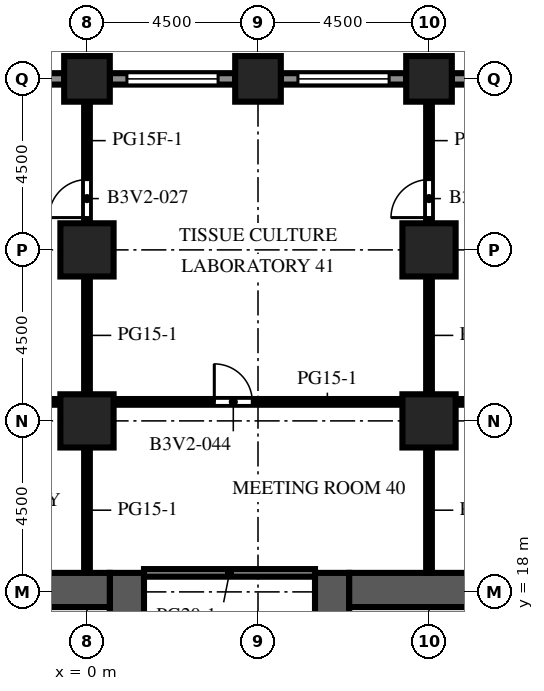
"""IFC4 building model, lengths in metres.
Left out: names, types, materials, properties, quantities, classifications, styles, units other than length and angle.
Written with IfcOpenShell. Run it as: python <this file> out.ifc"""

import sys

from ifc_helpers import new_model, si_unit, direction, frame, frame_2d, origin, origin_2d, place, context, subcontext, project, spatial, rectangle, extrude, element, fill, save


model = new_model("IFC4")
c1 = context("Model", 3, precision=1e-05, world=origin(), true_north=direction((0.0, 1.0)))
c2 = subcontext(c1, "Body", "Model", "MODEL_VIEW")
j1 = project(units=[si_unit("LENGTHUNIT", "METRE"), si_unit("PLANEANGLEUNIT", "RADIAN")], contexts=[c1])
p1 = place(None, origin())
s1 = spatial("IfcSite", under=j1, at=p1, CompositionType="ELEMENT")
p2 = place(p1, origin())
s2 = spatial("IfcBuilding", under=s1, at=p2, CompositionType="ELEMENT")
p3 = place(p2, frame((0.0, 0.0, 98.4)))
s3 = spatial("IfcBuildingStorey", under=s2, at=p3, CompositionType="ELEMENT", Elevation=98.4)
for number, where, z_axis, x_axis in (
    (1, (0.0, 31.5, 0.0), (0.0, 0.0, 1.0), (1.0, 0.0, 0.0)),
    (2, (4.5, 31.5, 0.0), (0.0, 0.0, 1.0), (1.0, 0.0, 0.0)),
    (3, (9.0, 31.5, 0.0), (0.0, 0.0, 1.0), (1.0, 0.0, 0.0)),
):
    element("IfcColumn", number, at=place(p3, frame(where, z_axis=z_axis, x_axis=x_axis)), inside=s3, PredefinedType="COLUMN", context=c2, shape_type="SweptSolid", body=[
        extrude(rectangle(XDim=1.2, YDim=1.2, at=origin_2d()), origin(), (0.0, 0.0, 1.0), 4.1),
    ])
for number, where, z_axis, x_axis in (
    (4, (0.0, 22.5, 0.0), (0.0, 0.0, 1.0), (1.0, 0.0, 0.0)),
    (5, (0.0, 27.0, 0.0), (0.0, 0.0, 1.0), (1.0, 0.0, 0.0)),
    (6, (9.0, 22.5, 0.0), (0.0, 0.0, 1.0), (1.0, 0.0, 0.0)),
    (7, (9.0, 27.0, 0.0), (0.0, 0.0, 1.0), (1.0, 0.0, 0.0)),
):
    element("IfcColumn", number, at=place(p3, frame(where, z_axis=z_axis, x_axis=x_axis)), inside=s3, PredefinedType="COLUMN", context=c2, shape_type="SweptSolid", body=[
        extrude(rectangle(XDim=1.4, YDim=1.4, at=origin_2d()), origin(), (0.0, 0.0, 1.0), 4.1),
    ])
p4 = place(p3, frame((1.05, -9.0, 0.0), z_axis=(0.0, 0.0, 1.0), x_axis=(0.0, 1.0, 0.0)))
e8 = element("IfcWall", 8, at=p4, inside=s3, PredefinedType="SHEAR", context=c2, shape_type="SweptSolid", body=[
    extrude(rectangle(XDim=27.5, YDim=0.9, at=frame_2d((13.75, 0.0))), origin(), (0.0, 0.0, 1.0), 4.1),
])
p5 = place(p4, frame((12.55, 0.0, 0.0)))
e9 = element("IfcOpeningElement", 9, at=p5, cuts=e8, PredefinedType="OPENING", context=c2, shape_type="SweptSolid", body=[
    extrude(rectangle(XDim=2.4, YDim=2.4, at=frame_2d((1.2, 1.2))), frame((0.0, 0.46, 0.0), z_axis=(0.0, -1.0, 0.0), x_axis=(1.0, 0.0, 0.0)), (0.0, 0.0, 1.0), 0.92),
])
p6 = place(p4, frame((3.893, 0.0, 0.0)))
e10 = element("IfcOpeningElement", 10, at=p6, cuts=e8, PredefinedType="OPENING", context=c2, shape_type="SweptSolid", body=[
    extrude(rectangle(XDim=0.923, YDim=2.1, at=frame_2d((0.461, 1.05))), frame((0.0, 0.46, 0.0), z_axis=(0.0, -1.0, 0.0), x_axis=(1.0, 0.0, 0.0)), (0.0, 0.0, 1.0), 0.92),
])
p7 = place(p4, frame((23.427, 0.0, 0.0)))
e11 = element("IfcOpeningElement", 11, at=p7, cuts=e8, PredefinedType="OPENING", context=c2, shape_type="SweptSolid", body=[
    extrude(rectangle(XDim=1.2, YDim=2.1, at=frame_2d((0.6, 1.05))), frame((0.0, 0.46, 0.0), z_axis=(0.0, -1.0, 0.0), x_axis=(1.0, 0.0, 0.0)), (0.0, 0.0, 1.0), 0.92),
])
p8 = place(p3, frame((-9.6, 18.05, 0.0), z_axis=(0.0, 0.0, 1.0), x_axis=(1.0, 0.0, 0.0)))
e12 = element("IfcWall", 12, at=p8, inside=s3, PredefinedType="SHEAR", context=c2, shape_type="SweptSolid", body=[
    extrude(rectangle(XDim=10.2, YDim=0.9, at=frame_2d((5.1, 0.0))), origin(), (0.0, 0.0, 1.0), 4.1),
])
p9 = place(p3, frame((6.45, -9.0, 0.0), z_axis=(0.0, 0.0, 1.0), x_axis=(0.0, 1.0, 0.0)))
e13 = element("IfcWall", 13, at=p9, inside=s3, PredefinedType="SHEAR", context=c2, shape_type="SweptSolid", body=[
    extrude(rectangle(XDim=27.5, YDim=0.9, at=frame_2d((13.75, 0.0))), origin(), (0.0, 0.0, 1.0), 4.1),
])
p10 = place(p9, frame((12.55, 0.0, 0.0)))
e14 = element("IfcOpeningElement", 14, at=p10, cuts=e13, PredefinedType="OPENING", context=c2, shape_type="SweptSolid", body=[
    extrude(rectangle(XDim=2.4, YDim=2.4, at=frame_2d((1.2, 1.2))), frame((0.0, 0.46, 0.0), z_axis=(0.0, -1.0, 0.0), x_axis=(1.0, 0.0, 0.0)), (0.0, 0.0, 1.0), 0.92),
])
p11 = place(p9, frame((3.893, 0.0, 0.0)))
e15 = element("IfcOpeningElement", 15, at=p11, cuts=e13, PredefinedType="OPENING", context=c2, shape_type="SweptSolid", body=[
    extrude(rectangle(XDim=0.923, YDim=2.1, at=frame_2d((0.461, 1.05))), frame((0.0, 0.46, 0.0), z_axis=(0.0, -1.0, 0.0), x_axis=(1.0, 0.0, 0.0)), (0.0, 0.0, 1.0), 0.92),
])
p12 = place(p9, frame((23.427, 0.0, 0.0)))
e16 = element("IfcOpeningElement", 16, at=p12, cuts=e13, PredefinedType="OPENING", context=c2, shape_type="SweptSolid", body=[
    extrude(rectangle(XDim=1.2, YDim=2.1, at=frame_2d((0.6, 1.05))), frame((0.0, 0.46, 0.0), z_axis=(0.0, -1.0, 0.0), x_axis=(1.0, 0.0, 0.0)), (0.0, 0.0, 1.0), 0.92),
])
p13 = place(p3, frame((6.9, 18.05, 0.0), z_axis=(0.0, 0.0, 1.0), x_axis=(1.0, 0.0, 0.0)))
e17 = element("IfcWall", 17, at=p13, inside=s3, PredefinedType="SHEAR", context=c2, shape_type="SweptSolid", body=[
    extrude(rectangle(XDim=10.2, YDim=0.9, at=frame_2d((5.1, 0.0))), origin(), (0.0, 0.0, 1.0), 4.1),
])
p14 = place(p3, frame((9.6, 31.5, 0.0), z_axis=(0.0, 0.0, 1.0), x_axis=(1.0, 0.0, 0.0)))
e18 = element("IfcWall", 18, at=p14, inside=s3, PredefinedType="SOLIDWALL", context=c2, shape_type="SweptSolid", body=[
    extrude(rectangle(XDim=3.3, YDim=0.3, at=frame_2d((1.65, 0.0))), origin(), (0.0, 0.0, 1.0), 2.75),
])
p15 = place(p14, frame((0.45, 0.0, 0.8)))
e19 = element("IfcOpeningElement", 19, at=p15, cuts=e18, PredefinedType="OPENING", context=c2, shape_type="SweptSolid", body=[
    extrude(rectangle(XDim=2.4, YDim=1.7, at=frame_2d((1.2, 0.85))), frame((0.0, 0.16, 0.0), z_axis=(0.0, -1.0, 0.0), x_axis=(1.0, 0.0, 0.0)), (0.0, 0.0, 1.0), 0.32),
])
p16 = place(p3, frame((5.1, 31.5, 0.0), z_axis=(0.0, 0.0, 1.0), x_axis=(1.0, 0.0, 0.0)))
e20 = element("IfcWall", 20, at=p16, inside=s3, PredefinedType="SOLIDWALL", context=c2, shape_type="SweptSolid", body=[
    extrude(rectangle(XDim=3.3, YDim=0.3, at=frame_2d((1.65, 0.0))), origin(), (0.0, 0.0, 1.0), 2.75),
])
p17 = place(p16, frame((0.45, 0.0, 0.8)))
e21 = element("IfcOpeningElement", 21, at=p17, cuts=e20, PredefinedType="OPENING", context=c2, shape_type="SweptSolid", body=[
    extrude(rectangle(XDim=2.4, YDim=1.7, at=frame_2d((1.2, 0.85))), frame((0.0, 0.16, 0.0), z_axis=(0.0, -1.0, 0.0), x_axis=(1.0, 0.0, 0.0)), (0.0, 0.0, 1.0), 0.32),
])
p18 = place(p3, frame((0.6, 31.5, 0.0), z_axis=(0.0, 0.0, 1.0), x_axis=(1.0, 0.0, 0.0)))
e22 = element("IfcWall", 22, at=p18, inside=s3, PredefinedType="SOLIDWALL", context=c2, shape_type="SweptSolid", body=[
    extrude(rectangle(XDim=3.3, YDim=0.3, at=frame_2d((1.65, 0.0))), origin(), (0.0, 0.0, 1.0), 2.75),
])
p19 = place(p18, frame((0.45, 0.0, 0.8)))
e23 = element("IfcOpeningElement", 23, at=p19, cuts=e22, PredefinedType="OPENING", context=c2, shape_type="SweptSolid", body=[
    extrude(rectangle(XDim=2.4, YDim=1.7, at=frame_2d((1.2, 0.85))), frame((0.0, 0.16, 0.0), z_axis=(0.0, -1.0, 0.0), x_axis=(1.0, 0.0, 0.0)), (0.0, 0.0, 1.0), 0.32),
])
p20 = place(p3, frame((-3.9, 31.5, 0.0), z_axis=(0.0, 0.0, 1.0), x_axis=(1.0, 0.0, 0.0)))
e24 = element("IfcWall", 24, at=p20, inside=s3, PredefinedType="SOLIDWALL", context=c2, shape_type="SweptSolid", body=[
    extrude(rectangle(XDim=3.3, YDim=0.3, at=frame_2d((1.65, 0.0))), origin(), (0.0, 0.0, 1.0), 2.75),
])
p21 = place(p20, frame((0.45, 0.0, 0.8)))
e25 = element("IfcOpeningElement", 25, at=p21, cuts=e24, PredefinedType="OPENING", context=c2, shape_type="SweptSolid", body=[
    extrude(rectangle(XDim=2.4, YDim=1.7, at=frame_2d((1.2, 0.85))), frame((0.0, 0.16, 0.0), z_axis=(0.0, -1.0, 0.0), x_axis=(1.0, 0.0, 0.0)), (0.0, 0.0, 1.0), 0.32),
])
p22 = place(p3, frame((-0.7, 15.028, 0.0), z_axis=(0.0, 0.0, 1.0), x_axis=(0.0, 1.0, 0.0)))
e26 = element("IfcWall", 26, at=p22, inside=s3, PredefinedType="PARTITIONING", context=c2, shape_type="SweptSolid", body=[
    extrude(rectangle(XDim=2.573, YDim=0.1, at=frame_2d((1.286, 0.0))), origin(), (0.0, 0.0, 1.0), 3.65),
])
p23 = place(p22, frame((0.786, 0.0, 0.0)))
e27 = element("IfcOpeningElement", 27, at=p23, cuts=e26, PredefinedType="OPENING", context=c2, shape_type="SweptSolid", body=[
    extrude(rectangle(XDim=1.0, YDim=2.1, at=frame_2d((0.5, 1.05))), frame((0.0, 0.06, 0.0), z_axis=(0.0, -1.0, 0.0), x_axis=(1.0, 0.0, 0.0)), (0.0, 0.0, 1.0), 0.12),
])
p24 = place(p3, frame((8.2, 15.028, 0.0), z_axis=(0.0, 0.0, 1.0), x_axis=(0.0, 1.0, 0.0)))
e28 = element("IfcWall", 28, at=p24, inside=s3, PredefinedType="PARTITIONING", context=c2, shape_type="SweptSolid", body=[
    extrude(rectangle(XDim=2.573, YDim=0.1, at=frame_2d((1.286, 0.0))), origin(), (0.0, 0.0, 1.0), 3.65),
])
p25 = place(p24, frame((0.786, 0.0, 0.0)))
e29 = element("IfcOpeningElement", 29, at=p25, cuts=e28, PredefinedType="OPENING", context=c2, shape_type="SweptSolid", body=[
    extrude(rectangle(XDim=1.0, YDim=2.1, at=frame_2d((0.5, 1.05))), frame((0.0, 0.06, 0.0), z_axis=(0.0, -1.0, 0.0), x_axis=(1.0, 0.0, 0.0)), (0.0, 0.0, 1.0), 0.12),
])
p26 = place(p3, frame((0.0, 18.5, 0.0), z_axis=(0.0, 0.0, 1.0), x_axis=(0.0, 1.0, 0.0)))
e30 = element("IfcWall", 30, at=p26, inside=s3, PredefinedType="PARTITIONING", context=c2, shape_type="SweptSolid", body=[
    extrude(rectangle(XDim=3.3, YDim=0.15, at=frame_2d((1.65, 0.0))), origin(), (0.0, 0.0, 1.0), 3.65),
])
p27 = place(p3, frame((0.0, 23.2, 0.0), z_axis=(0.0, 0.0, 1.0), x_axis=(0.0, 1.0, 0.0)))
e31 = element("IfcWall", 31, at=p27, inside=s3, PredefinedType="PARTITIONING", context=c2, shape_type="SweptSolid", body=[
    extrude(rectangle(XDim=3.1, YDim=0.15, at=frame_2d((1.55, 0.0))), origin(), (0.0, 0.0, 1.0), 3.65),
])
p28 = place(p3, frame((0.0, 30.9, 0.0), z_axis=(0.0, 0.0, 1.0), x_axis=(0.0, -1.0, 0.0)))
e32 = element("IfcWall", 32, at=p28, inside=s3, PredefinedType="PARTITIONING", context=c2, shape_type="SweptSolid", body=[
    extrude(rectangle(XDim=3.2, YDim=0.15, at=frame_2d((1.6, 0.0))), origin(), (0.0, 0.0, 1.0), 3.65),
])
p29 = place(p28, frame((2.05, 0.0, 0.0)))
e33 = element("IfcOpeningElement", 33, at=p29, cuts=e32, PredefinedType="OPENING", context=c2, shape_type="SweptSolid", body=[
    extrude(rectangle(XDim=1.0, YDim=2.1, at=frame_2d((0.5, 1.05))), frame((0.0, 0.085, 0.0), z_axis=(0.0, -1.0, 0.0), x_axis=(1.0, 0.0, 0.0)), (0.0, 0.0, 1.0), 0.17),
])
p30 = place(p3, frame((9.0, 18.5, 0.0), z_axis=(0.0, 0.0, 1.0), x_axis=(0.0, 1.0, 0.0)))
e34 = element("IfcWall", 34, at=p30, inside=s3, PredefinedType="PARTITIONING", context=c2, shape_type="SweptSolid", body=[
    extrude(rectangle(XDim=3.3, YDim=0.15, at=frame_2d((1.65, 0.0))), origin(), (0.0, 0.0, 1.0), 3.65),
])
p31 = place(p3, frame((9.0, 23.2, 0.0), z_axis=(0.0, 0.0, 1.0), x_axis=(0.0, 1.0, 0.0)))
e35 = element("IfcWall", 35, at=p31, inside=s3, PredefinedType="PARTITIONING", context=c2, shape_type="SweptSolid", body=[
    extrude(rectangle(XDim=3.1, YDim=0.15, at=frame_2d((1.55, 0.0))), origin(), (0.0, 0.0, 1.0), 3.65),
])
p32 = place(p3, frame((9.0, 30.9, 0.0), z_axis=(0.0, 0.0, 1.0), x_axis=(0.0, -1.0, 0.0)))
e36 = element("IfcWall", 36, at=p32, inside=s3, PredefinedType="PARTITIONING", context=c2, shape_type="SweptSolid", body=[
    extrude(rectangle(XDim=3.2, YDim=0.15, at=frame_2d((1.6, 0.0))), origin(), (0.0, 0.0, 1.0), 3.65),
])
p33 = place(p32, frame((2.05, 0.0, 0.0)))
e37 = element("IfcOpeningElement", 37, at=p33, cuts=e36, PredefinedType="OPENING", context=c2, shape_type="SweptSolid", body=[
    extrude(rectangle(XDim=1.0, YDim=2.1, at=frame_2d((0.5, 1.05))), frame((0.0, 0.085, 0.0), z_axis=(0.0, -1.0, 0.0), x_axis=(1.0, 0.0, 0.0)), (0.0, 0.0, 1.0), 0.17),
])
p34 = place(p3, frame((1.5, 18.5, 0.0), z_axis=(0.0, 0.0, 1.0), x_axis=(1.0, 0.0, 0.0)))
e38 = element("IfcWall", 38, at=p34, inside=s3, PredefinedType="PARTITIONING", context=c2, shape_type="SweptSolid", body=[
    extrude(rectangle(XDim=4.5, YDim=0.2, at=frame_2d((2.25, 0.0))), origin(), (0.0, 0.0, 1.0), 3.65),
])
p35 = place(p3, frame((-0.7, 23.0, 0.0), z_axis=(0.0, 0.0, 1.0), x_axis=(-1.0, 0.0, 0.0)))
e39 = element("IfcWall", 39, at=p35, inside=s3, PredefinedType="PARTITIONING", context=c2, shape_type="SweptSolid", body=[
    extrude(rectangle(XDim=7.6, YDim=0.15, at=frame_2d((3.8, 0.0))), origin(), (0.0, 0.0, 1.0), 3.65),
])
p36 = place(p35, frame((5.45, 0.0, 0.0)))
e40 = element("IfcOpeningElement", 40, at=p36, cuts=e39, PredefinedType="OPENING", context=c2, shape_type="SweptSolid", body=[
    extrude(rectangle(XDim=1.0, YDim=2.1, at=frame_2d((0.5, 1.05))), frame((0.0, 0.085, 0.0), z_axis=(0.0, -1.0, 0.0), x_axis=(1.0, 0.0, 0.0)), (0.0, 0.0, 1.0), 0.17),
])
p37 = place(p35, frame((0.95, 0.0, 0.0)))
e41 = element("IfcOpeningElement", 41, at=p37, cuts=e39, PredefinedType="OPENING", context=c2, shape_type="SweptSolid", body=[
    extrude(rectangle(XDim=1.0, YDim=2.1, at=frame_2d((0.5, 1.05))), frame((0.0, 0.085, 0.0), z_axis=(0.0, -1.0, 0.0), x_axis=(1.0, 0.0, 0.0)), (0.0, 0.0, 1.0), 0.17),
])
p38 = place(p3, frame((8.3, 23.0, 0.0), z_axis=(0.0, 0.0, 1.0), x_axis=(-1.0, 0.0, 0.0)))
e42 = element("IfcWall", 42, at=p38, inside=s3, PredefinedType="PARTITIONING", context=c2, shape_type="SweptSolid", body=[
    extrude(rectangle(XDim=7.6, YDim=0.15, at=frame_2d((3.8, 0.0))), origin(), (0.0, 0.0, 1.0), 3.65),
])
p39 = place(p38, frame((3.95, 0.0, 0.0)))
e43 = element("IfcOpeningElement", 43, at=p39, cuts=e42, PredefinedType="OPENING", context=c2, shape_type="SweptSolid", body=[
    extrude(rectangle(XDim=1.0, YDim=2.1, at=frame_2d((0.5, 1.05))), frame((0.0, 0.085, 0.0), z_axis=(0.0, -1.0, 0.0), x_axis=(1.0, 0.0, 0.0)), (0.0, 0.0, 1.0), 0.17),
])
p40 = place(p3, frame((17.3, 23.0, 0.0), z_axis=(0.0, 0.0, 1.0), x_axis=(-1.0, 0.0, 0.0)))
e44 = element("IfcWall", 44, at=p40, inside=s3, PredefinedType="PARTITIONING", context=c2, shape_type="SweptSolid", body=[
    extrude(rectangle(XDim=7.6, YDim=0.15, at=frame_2d((3.8, 0.0))), origin(), (0.0, 0.0, 1.0), 3.65),
])
p41 = place(p40, frame((5.7, 0.0, 0.0)))
e45 = element("IfcOpeningElement", 45, at=p41, cuts=e44, PredefinedType="OPENING", context=c2, shape_type="SweptSolid", body=[
    extrude(rectangle(XDim=1.0, YDim=2.1, at=frame_2d((0.5, 1.05))), frame((0.0, 0.085, 0.0), z_axis=(0.0, -1.0, 0.0), x_axis=(1.0, 0.0, 0.0)), (0.0, 0.0, 1.0), 0.17),
])
p42 = place(p40, frame((1.45, 0.0, 0.0)))
e46 = element("IfcOpeningElement", 46, at=p42, cuts=e44, PredefinedType="OPENING", context=c2, shape_type="SweptSolid", body=[
    extrude(rectangle(XDim=1.0, YDim=2.1, at=frame_2d((0.5, 1.05))), frame((0.0, 0.085, 0.0), z_axis=(0.0, -1.0, 0.0), x_axis=(1.0, 0.0, 0.0)), (0.0, 0.0, 1.0), 0.17),
])
p43 = place(p17, origin())
e47 = element("IfcWindow", 47, at=p43, inside=s3, PartitioningType="SINGLE_PANEL", PredefinedType="WINDOW", context=c2, shape_type="SweptSolid", body=[
    extrude(rectangle(XDim=2.4, YDim=1.7, at=frame_2d((1.2, 0.85))), frame((0.0, 0.03, 0.0), z_axis=(0.0, -1.0, 0.0), x_axis=(1.0, 0.0, 0.0)), (0.0, 0.0, 1.0), 0.06),
])
fill(e21, e47)
p44 = place(p19, origin())
e48 = element("IfcWindow", 48, at=p44, inside=s3, PartitioningType="SINGLE_PANEL", PredefinedType="WINDOW", context=c2, shape_type="SweptSolid", body=[
    extrude(rectangle(XDim=2.4, YDim=1.7, at=frame_2d((1.2, 0.85))), frame((0.0, 0.03, 0.0), z_axis=(0.0, -1.0, 0.0), x_axis=(1.0, 0.0, 0.0)), (0.0, 0.0, 1.0), 0.06),
])
fill(e23, e48)
p45 = place(p29, origin())
e49 = element("IfcDoor", 49, at=p45, inside=s3, OperationType="SINGLE_SWING_RIGHT", PredefinedType="DOOR", context=c2, shape_type="SweptSolid", body=[
    extrude(rectangle(XDim=1.0, YDim=2.1, at=frame_2d((0.5, 1.05))), frame((0.0, 0.025, 0.0), z_axis=(0.0, -1.0, 0.0), x_axis=(1.0, 0.0, 0.0)), (0.0, 0.0, 1.0), 0.05),
])
fill(e33, e49)
p46 = place(p33, origin())
e50 = element("IfcDoor", 50, at=p46, inside=s3, OperationType="SINGLE_SWING_RIGHT", PredefinedType="DOOR", context=c2, shape_type="SweptSolid", body=[
    extrude(rectangle(XDim=1.0, YDim=2.1, at=frame_2d((0.5, 1.05))), frame((0.0, 0.025, 0.0), z_axis=(0.0, -1.0, 0.0), x_axis=(1.0, 0.0, 0.0)), (0.0, 0.0, 1.0), 0.05),
])
fill(e37, e50)
p47 = place(p39, origin())
e51 = element("IfcDoor", 51, at=p47, inside=s3, OperationType="SINGLE_SWING_RIGHT", PredefinedType="DOOR", context=c2, shape_type="SweptSolid", body=[
    extrude(rectangle(XDim=1.0, YDim=2.1, at=frame_2d((0.5, 1.05))), frame((0.0, 0.025, 0.0), z_axis=(0.0, -1.0, 0.0), x_axis=(1.0, 0.0, 0.0)), (0.0, 0.0, 1.0), 0.05),
])
fill(e43, e51)
save(model, sys.argv[1])
